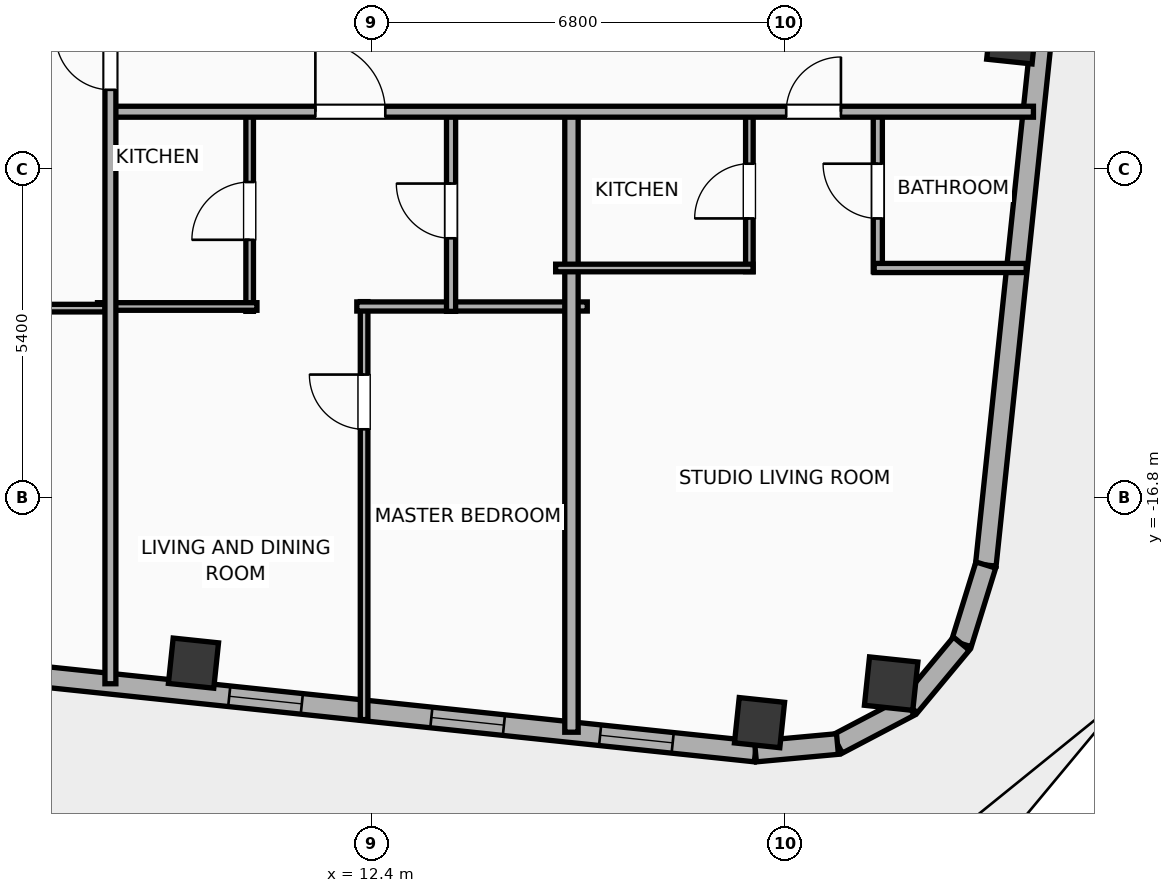
"""IFC4 building model, lengths in metres.
Left out: names, types, materials, properties, quantities, classifications, styles, units other than length and angle.
Written with IfcOpenShell. Run it as: python <this file> out.ifc"""

import sys

from ifc_helpers import new_model, si_unit, direction, frame, frame_2d, origin, origin_2d, place, context, subcontext, project, spatial, rectangle, hollow_rectangle, hollow_circle, extrude, element, fill, save


model = new_model("IFC4")
c1 = context("Model", 3, precision=1e-05, world=origin(), true_north=direction((0.0, 1.0)))
c2 = subcontext(c1, "Body", "Model", "MODEL_VIEW")
j1 = project(units=[si_unit("LENGTHUNIT", "METRE"), si_unit("PLANEANGLEUNIT", "RADIAN")], contexts=[c1])
p1 = place(None, origin())
s1 = spatial("IfcSite", under=j1, at=p1, CompositionType="ELEMENT")
p2 = place(p1, origin())
s2 = spatial("IfcBuilding", under=s1, at=p2, CompositionType="ELEMENT")
p3 = place(p2, frame((0.0, 0.0, 291.2)))
s3 = spatial("IfcBuildingStorey", under=s2, at=p3, CompositionType="ELEMENT", Elevation=291.2)
for number, where, z_axis, x_axis in (
    (1, (9.466, -19.518, 0.0), (0.0, 0.0, 1.0), (0.995, -0.105, 0.0)),
    (2, (18.775, -20.497, 0.0), (0.0, 0.0, 1.0), (0.995, -0.105, 0.0)),
):
    element("IfcColumn", number, at=place(p3, frame(where, z_axis=z_axis, x_axis=x_axis)), inside=s3, PredefinedType="COLUMN", context=c2, shape_type="SweptSolid", body=[
        extrude(hollow_rectangle(XDim=0.75, YDim=0.75, WallThickness=0.025, at=origin_2d()), origin(), (0.0, 0.0, 1.0), 3.9),
    ])
p4 = place(p3, frame((20.939, -19.855, 0.0), z_axis=(0.0, 0.0, 1.0), x_axis=(0.994521895368, -0.104528463268, 0.0)))
e3 = element("IfcColumn", 3, at=p4, inside=s3, PredefinedType="COLUMN", context=c2, shape_type="SweptSolid", body=[
    extrude(hollow_circle(Radius=0.4, WallThickness=0.028, at=origin_2d()), origin(), (0.0, 0.0, 1.0), 3.9),
])
p5 = place(p3, frame((22.923, -9.252, 0.0), z_axis=(0.0, 0.0, 1.0), x_axis=(0.994521895368, -0.104528463268, 0.0)))
e4 = element("IfcColumn", 4, at=p5, inside=s3, PredefinedType="COLUMN", context=c2, shape_type="SweptSolid", body=[
    extrude(hollow_rectangle(XDim=0.75, YDim=0.75, WallThickness=0.025, at=origin_2d()), origin(), (0.0, 0.0, 1.0), 3.9),
])
p6 = place(p3, frame((18.708, -20.972, 0.0), z_axis=(0.0, 0.0, 1.0), x_axis=(-0.994521888554, 0.104528528102, 0.0)))
e5 = element("IfcWall", 5, at=p6, inside=s3, PredefinedType="ELEMENTEDWALL", context=c2, shape_type="SweptSolid", body=[
    extrude(rectangle(XDim=46.766, YDim=0.34, at=frame_2d((23.383, 0.0))), origin(), (0.0, 0.0, 1.0), 3.635),
])
p7 = place(p6, frame((23.733, 0.0, 0.65)))
e6 = element("IfcOpeningElement", 6, at=p7, cuts=e5, PredefinedType="OPENING", context=c2, shape_type="SweptSolid", body=[
    extrude(rectangle(XDim=2.6, YDim=2.45, at=frame_2d((1.3, 1.225))), frame((0.0, 0.18, 0.0), z_axis=(0.0, -1.0, 0.0), x_axis=(1.0, 0.0, 0.0)), (0.0, 0.0, 1.0), 0.36),
])
p8 = place(p6, frame((44.402, 0.0, 0.75)))
e7 = element("IfcOpeningElement", 7, at=p8, cuts=e5, PredefinedType="OPENING", context=c2, shape_type="SweptSolid", body=[
    extrude(rectangle(XDim=1.2, YDim=2.05, at=frame_2d((0.6, 1.025))), frame((0.0, 0.18, 0.0), z_axis=(0.0, -1.0, 0.0), x_axis=(1.0, 0.0, 0.0)), (0.0, 0.0, 1.0), 0.36),
])
p9 = place(p6, frame((39.54, 0.0, 0.75)))
e8 = element("IfcOpeningElement", 8, at=p9, cuts=e5, PredefinedType="OPENING", context=c2, shape_type="SweptSolid", body=[
    extrude(rectangle(XDim=1.2, YDim=2.05, at=frame_2d((0.6, 1.025))), frame((0.0, 0.18, 0.0), z_axis=(0.0, -1.0, 0.0), x_axis=(1.0, 0.0, 0.0)), (0.0, 0.0, 1.0), 0.36),
])
p10 = place(p6, frame((42.406, 0.0, 0.75)))
e9 = element("IfcOpeningElement", 9, at=p10, cuts=e5, PredefinedType="OPENING", context=c2, shape_type="SweptSolid", body=[
    extrude(rectangle(XDim=1.2, YDim=2.05, at=frame_2d((0.6, 1.025))), frame((0.0, 0.18, 0.0), z_axis=(0.0, -1.0, 0.0), x_axis=(1.0, 0.0, 0.0)), (0.0, 0.0, 1.0), 0.36),
])
p11 = place(p6, frame((34.933, 0.0, 0.75)))
e10 = element("IfcOpeningElement", 10, at=p11, cuts=e5, PredefinedType="OPENING", context=c2, shape_type="SweptSolid", body=[
    extrude(rectangle(XDim=1.2, YDim=2.05, at=frame_2d((0.6, 1.025))), frame((0.0, 0.18, 0.0), z_axis=(0.0, -1.0, 0.0), x_axis=(1.0, 0.0, 0.0)), (0.0, 0.0, 1.0), 0.36),
])
p12 = place(p6, frame((28.631, 0.0, 0.75)))
e11 = element("IfcOpeningElement", 11, at=p12, cuts=e5, PredefinedType="OPENING", context=c2, shape_type="SweptSolid", body=[
    extrude(rectangle(XDim=1.2, YDim=2.05, at=frame_2d((0.6, 1.025))), frame((0.0, 0.18, 0.0), z_axis=(0.0, -1.0, 0.0), x_axis=(1.0, 0.0, 0.0)), (0.0, 0.0, 1.0), 0.36),
])
p13 = place(p6, frame((30.896, 0.0, 0.75)))
e12 = element("IfcOpeningElement", 12, at=p13, cuts=e5, PredefinedType="OPENING", context=c2, shape_type="SweptSolid", body=[
    extrude(rectangle(XDim=1.2, YDim=2.05, at=frame_2d((0.6, 1.025))), frame((0.0, 0.18, 0.0), z_axis=(0.0, -1.0, 0.0), x_axis=(1.0, 0.0, 0.0)), (0.0, 0.0, 1.0), 0.36),
])
p14 = place(p6, frame((7.501, 0.0, 0.75)))
e13 = element("IfcOpeningElement", 13, at=p14, cuts=e5, PredefinedType="OPENING", context=c2, shape_type="SweptSolid", body=[
    extrude(rectangle(XDim=1.2, YDim=2.05, at=frame_2d((0.6, 1.025))), frame((0.0, 0.18, 0.0), z_axis=(0.0, -1.0, 0.0), x_axis=(1.0, 0.0, 0.0)), (0.0, 0.0, 1.0), 0.36),
])
p15 = place(p6, frame((4.159, 0.0, 0.75)))
e14 = element("IfcOpeningElement", 14, at=p15, cuts=e5, PredefinedType="OPENING", context=c2, shape_type="SweptSolid", body=[
    extrude(rectangle(XDim=1.2, YDim=2.05, at=frame_2d((0.6, 1.025))), frame((0.0, 0.18, 0.0), z_axis=(0.0, -1.0, 0.0), x_axis=(1.0, 0.0, 0.0)), (0.0, 0.0, 1.0), 0.36),
])
p16 = place(p6, frame((1.369, 0.0, 0.75)))
e15 = element("IfcOpeningElement", 15, at=p16, cuts=e5, PredefinedType="OPENING", context=c2, shape_type="SweptSolid", body=[
    extrude(rectangle(XDim=1.2, YDim=2.05, at=frame_2d((0.6, 1.025))), frame((0.0, 0.18, 0.0), z_axis=(0.0, -1.0, 0.0), x_axis=(1.0, 0.0, 0.0)), (0.0, 0.0, 1.0), 0.36),
])
p17 = place(p6, frame((20.254, 0.0, 0.75)))
e16 = element("IfcOpeningElement", 16, at=p17, cuts=e5, PredefinedType="OPENING", context=c2, shape_type="SweptSolid", body=[
    extrude(rectangle(XDim=1.2, YDim=2.05, at=frame_2d((0.6, 1.025))), frame((0.0, 0.18, 0.0), z_axis=(0.0, -1.0, 0.0), x_axis=(1.0, 0.0, 0.0)), (0.0, 0.0, 1.0), 0.36),
])
p18 = place(p6, frame((16.172, 0.0, 0.75)))
e17 = element("IfcOpeningElement", 17, at=p18, cuts=e5, PredefinedType="OPENING", context=c2, shape_type="SweptSolid", body=[
    extrude(rectangle(XDim=1.2, YDim=2.05, at=frame_2d((0.6, 1.025))), frame((0.0, 0.18, 0.0), z_axis=(0.0, -1.0, 0.0), x_axis=(1.0, 0.0, 0.0)), (0.0, 0.0, 1.0), 0.36),
])
p19 = place(p6, frame((12.11, 0.0, 0.75)))
e18 = element("IfcOpeningElement", 18, at=p19, cuts=e5, PredefinedType="OPENING", context=c2, shape_type="SweptSolid", body=[
    extrude(rectangle(XDim=1.2, YDim=2.05, at=frame_2d((0.6, 1.025))), frame((0.0, 0.18, 0.0), z_axis=(0.0, -1.0, 0.0), x_axis=(1.0, 0.0, 0.0)), (0.0, 0.0, 1.0), 0.36),
])
p20 = place(p3, frame((25.67, 12.296, 0.0), z_axis=(0.0, 0.0, 1.0), x_axis=(-0.104533282919, -0.994521388791, 0.0)))
e19 = element("IfcWall", 19, at=p20, inside=s3, PredefinedType="ELEMENTEDWALL", context=c2, shape_type="SweptSolid", body=[
    extrude(rectangle(XDim=30.366, YDim=0.34, at=frame_2d((15.183, 0.0))), origin(), (0.0, 0.0, 1.0), 3.635),
])
p21 = place(p20, frame((5.442, 0.0, 0.65)))
e20 = element("IfcOpeningElement", 20, at=p21, cuts=e19, PredefinedType="OPENING", context=c2, shape_type="SweptSolid", body=[
    extrude(rectangle(XDim=2.6, YDim=2.45, at=frame_2d((1.3, 1.225))), frame((0.0, 0.18, 0.0), z_axis=(0.0, -1.0, 0.0), x_axis=(1.0, 0.0, 0.0)), (0.0, 0.0, 1.0), 0.36),
])
p22 = place(p20, frame((18.005, 0.0, 0.75)))
e21 = element("IfcOpeningElement", 21, at=p22, cuts=e19, PredefinedType="OPENING", context=c2, shape_type="SweptSolid", body=[
    extrude(rectangle(XDim=1.2, YDim=2.05, at=frame_2d((0.6, 1.025))), frame((0.0, 0.18, 0.0), z_axis=(0.0, -1.0, 0.0), x_axis=(1.0, 0.0, 0.0)), (0.0, 0.0, 1.0), 0.36),
])
p23 = place(p3, frame((22.496, -17.905, 0.0), z_axis=(0.0, 0.0, 1.0), x_axis=(-0.296416228123, -0.955058856671, 0.0)))
e22 = element("IfcWall", 22, at=p23, inside=s3, PredefinedType="ELEMENTEDWALL", context=c2, shape_type="SweptSolid", body=[
    extrude(rectangle(XDim=1.354, YDim=0.34, at=frame_2d((0.677, 0.0))), origin(), (0.0, 0.0, 1.0), 3.635),
])
p24 = place(p3, frame((22.094, -19.198, 0.0), z_axis=(0.0, 0.0, 1.0), x_axis=(-0.639501603217, -0.768789762863, 0.0)))
e23 = element("IfcWall", 23, at=p24, inside=s3, PredefinedType="ELEMENTEDWALL", context=c2, shape_type="SweptSolid", body=[
    extrude(rectangle(XDim=1.337, YDim=0.34, at=frame_2d((0.668, 0.0))), origin(), (0.0, 0.0, 1.0), 3.635),
])
p25 = place(p3, frame((21.24, -20.226, 0.0), z_axis=(0.0, 0.0, 1.0), x_axis=(-0.884922182678, -0.465738908193, 0.0)))
e24 = element("IfcWall", 24, at=p25, inside=s3, PredefinedType="ELEMENTEDWALL", context=c2, shape_type="SweptSolid", body=[
    extrude(rectangle(XDim=1.337, YDim=0.34, at=frame_2d((0.668, 0.0))), origin(), (0.0, 0.0, 1.0), 3.635),
])
p26 = place(p3, frame((20.056, -20.848, 0.0), z_axis=(0.0, 0.0, 1.0), x_axis=(-0.995813013343, -0.091413579172, 0.0)))
e25 = element("IfcWall", 25, at=p26, inside=s3, PredefinedType="ELEMENTEDWALL", context=c2, shape_type="SweptSolid", body=[
    extrude(rectangle(XDim=1.354, YDim=0.34, at=frame_2d((0.677, 0.0))), origin(), (0.0, 0.0, 1.0), 3.635),
])
p27 = place(p3, frame((12.272, -20.447, 0.0), z_axis=(0.0, 0.0, 1.0), x_axis=(0.0, 1.0, 0.0)))
e26 = element("IfcWall", 26, at=p27, inside=s3, PredefinedType="PARTITIONING", context=c2, shape_type="SweptSolid", body=[
    extrude(rectangle(XDim=6.874, YDim=0.125, at=frame_2d((3.437, 0.0))), origin(), (0.0, 0.0, 1.0), 3.635),
])
p28 = place(p27, frame((4.774, 0.0, 0.0)))
e27 = element("IfcOpeningElement", 27, at=p28, cuts=e26, PredefinedType="OPENING", context=c2, shape_type="SweptSolid", body=[
    extrude(rectangle(XDim=0.9, YDim=2.05, at=frame_2d((0.45, 1.025))), frame((0.0, 0.073, 0.0), z_axis=(0.0, -1.0, 0.0), x_axis=(1.0, 0.0, 0.0)), (0.0, 0.0, 1.0), 0.145),
])
p29 = place(p3, frame((12.152, -13.653, 0.0), z_axis=(0.0, 0.0, 1.0), x_axis=(1.0, 0.0, 0.0)))
e28 = element("IfcWall", 28, at=p29, inside=s3, PredefinedType="PLUMBINGWALL", context=c2, shape_type="SweptSolid", body=[
    extrude(rectangle(XDim=3.79, YDim=0.15, at=frame_2d((1.895, 0.0))), origin(), (0.0, 0.0, 1.0), 3.635),
])
p30 = place(p3, frame((10.39, -13.733, 0.0), z_axis=(0.0, 0.0, 1.0), x_axis=(0.0, 1.0, 0.0)))
e29 = element("IfcWall", 29, at=p30, inside=s3, PredefinedType="PARTITIONING", context=c2, shape_type="SweptSolid", body=[
    extrude(rectangle(XDim=3.303, YDim=0.125, at=frame_2d((1.651, 0.0))), origin(), (0.0, 0.0, 1.0), 3.635),
])
p31 = place(p30, frame((1.177, 0.0, 0.0)))
e30 = element("IfcOpeningElement", 30, at=p31, cuts=e29, PredefinedType="OPENING", context=c2, shape_type="SweptSolid", body=[
    extrude(rectangle(XDim=0.95, YDim=2.05, at=frame_2d((0.475, 1.025))), frame((0.0, 0.073, 0.0), z_axis=(0.0, -1.0, 0.0), x_axis=(1.0, 0.0, 0.0)), (0.0, 0.0, 1.0), 0.145),
])
p32 = place(p3, frame((7.887, -13.653, 0.0), z_axis=(0.0, 0.0, 1.0), x_axis=(1.0, 0.0, 0.0)))
e31 = element("IfcWall", 31, at=p32, inside=s3, PredefinedType="PARTITIONING", context=c2, shape_type="SweptSolid", body=[
    extrude(rectangle(XDim=2.623, YDim=0.125, at=frame_2d((1.311, 0.0))), origin(), (0.0, 0.0, 1.0), 3.635),
])
p33 = place(p3, frame((13.702, -13.733, 0.0), z_axis=(0.0, 0.0, 1.0), x_axis=(0.0, 1.0, 0.0)))
e32 = element("IfcWall", 32, at=p33, inside=s3, PredefinedType="PLUMBINGWALL", context=c2, shape_type="SweptSolid", body=[
    extrude(rectangle(XDim=3.303, YDim=0.15, at=frame_2d((1.651, 0.0))), origin(), (0.0, 0.0, 1.0), 3.635),
])
p34 = place(p33, frame((1.201, 0.0, 0.0)))
e33 = element("IfcOpeningElement", 33, at=p34, cuts=e32, PredefinedType="OPENING", context=c2, shape_type="SweptSolid", body=[
    extrude(rectangle(XDim=0.9, YDim=2.05, at=frame_2d((0.45, 1.025))), frame((0.0, 0.085, 0.0), z_axis=(0.0, -1.0, 0.0), x_axis=(1.0, 0.0, 0.0)), (0.0, 0.0, 1.0), 0.17),
])
p35 = place(p3, frame((15.682, -20.654, 0.0), z_axis=(0.0, 0.0, 1.0), x_axis=(0.0, 1.0, 0.0)))
e34 = element("IfcWall", 34, at=p35, inside=s3, PredefinedType="PARTITIONING", context=c2, shape_type="SweptSolid", body=[
    extrude(rectangle(XDim=10.284, YDim=0.22, at=frame_2d((5.142, 0.0))), origin(), (0.0, 0.0, 1.0), 3.635),
])
p36 = place(p3, frame((18.608, -13.08, 0.0), z_axis=(0.0, 0.0, 1.0), x_axis=(0.0, 1.0, 0.0)))
e35 = element("IfcWall", 35, at=p36, inside=s3, PredefinedType="PARTITIONING", context=c2, shape_type="SweptSolid", body=[
    extrude(rectangle(XDim=2.65, YDim=0.125, at=frame_2d((1.325, 0.0))), origin(), (0.0, 0.0, 1.0), 3.635),
])
p37 = place(p36, frame((0.875, 0.0, 0.0)))
e36 = element("IfcOpeningElement", 36, at=p37, cuts=e35, PredefinedType="OPENING", context=c2, shape_type="SweptSolid", body=[
    extrude(rectangle(XDim=0.9, YDim=2.05, at=frame_2d((0.45, 1.025))), frame((0.0, 0.073, 0.0), z_axis=(0.0, -1.0, 0.0), x_axis=(1.0, 0.0, 0.0)), (0.0, 0.0, 1.0), 0.145),
])
p38 = place(p3, frame((20.72, -13.08, 0.0), z_axis=(0.0, 0.0, 1.0), x_axis=(0.0, 1.0, 0.0)))
e37 = element("IfcWall", 37, at=p38, inside=s3, PredefinedType="PLUMBINGWALL", context=c2, shape_type="SweptSolid", body=[
    extrude(rectangle(XDim=2.65, YDim=0.15, at=frame_2d((1.325, 0.0))), origin(), (0.0, 0.0, 1.0), 3.635),
])
p39 = place(p38, frame((0.875, 0.0, 0.0)))
e38 = element("IfcOpeningElement", 38, at=p39, cuts=e37, PredefinedType="OPENING", context=c2, shape_type="SweptSolid", body=[
    extrude(rectangle(XDim=0.9, YDim=2.05, at=frame_2d((0.45, 1.025))), frame((0.0, 0.085, 0.0), z_axis=(0.0, -1.0, 0.0), x_axis=(1.0, 0.0, 0.0)), (0.0, 0.0, 1.0), 0.17),
])
p40 = place(p3, frame((15.422, -13.02, 0.0), z_axis=(0.0, 0.0, 1.0), x_axis=(1.0, 0.0, 0.0)))
e39 = element("IfcWall", 39, at=p40, inside=s3, PredefinedType="PARTITIONING", context=c2, shape_type="SweptSolid", body=[
    extrude(rectangle(XDim=3.246, YDim=0.125, at=frame_2d((1.623, 0.0))), origin(), (0.0, 0.0, 1.0), 3.635),
])
p41 = place(p3, frame((20.66, -13.02, 0.0), z_axis=(0.0, 0.0, 1.0), x_axis=(1.0, 0.0, 0.0)))
e40 = element("IfcWall", 40, at=p41, inside=s3, PredefinedType="PLUMBINGWALL", context=c2, shape_type="SweptSolid", body=[
    extrude(rectangle(XDim=2.5, YDim=0.15, at=frame_2d((1.25, 0.0))), origin(), (0.0, 0.0, 1.0), 3.635),
])
p42 = place(p3, frame((8.08, -10.45, 0.0), z_axis=(0.0, 0.0, 1.0), x_axis=(1.0, 0.0, 0.0)))
e41 = element("IfcWall", 41, at=p42, inside=s3, PredefinedType="PARTITIONING", context=c2, shape_type="SweptSolid", body=[
    extrude(rectangle(XDim=15.199, YDim=0.18, at=frame_2d((7.6, 0.0))), origin(), (0.0, 0.0, 1.0), 3.635),
])
p43 = place(p42, frame((3.39, 0.0, 0.0)))
e42 = element("IfcOpeningElement", 42, at=p43, cuts=e41, PredefinedType="OPENING", context=c2, shape_type="SweptSolid", body=[
    extrude(rectangle(XDim=1.15, YDim=2.05, at=frame_2d((0.575, 1.025))), frame((0.0, 0.1, 0.0), z_axis=(0.0, -1.0, 0.0), x_axis=(1.0, 0.0, 0.0)), (0.0, 0.0, 1.0), 0.2),
])
p44 = place(p42, frame((11.134, 0.0, 0.0)))
e43 = element("IfcOpeningElement", 43, at=p44, cuts=e41, PredefinedType="OPENING", context=c2, shape_type="SweptSolid", body=[
    extrude(rectangle(XDim=0.9, YDim=2.05, at=frame_2d((0.45, 1.025))), frame((0.0, 0.1, 0.0), z_axis=(0.0, -1.0, 0.0), x_axis=(1.0, 0.0, 0.0)), (0.0, 0.0, 1.0), 0.2),
])
p45 = place(p3, frame((0.02, -13.68, 0.0), z_axis=(0.0, 0.0, 1.0), x_axis=(1.0, 0.0, 0.0)))
e44 = element("IfcWall", 44, at=p45, inside=s3, PredefinedType="PARTITIONING", context=c2, shape_type="SweptSolid", body=[
    extrude(rectangle(XDim=7.992, YDim=0.125, at=frame_2d((3.996, 0.0))), origin(), (0.0, 0.0, 1.0), 3.635),
])
p46 = place(p45, frame((1.323, 0.0, 0.0)))
e45 = element("IfcOpeningElement", 45, at=p46, cuts=e44, PredefinedType="OPENING", context=c2, shape_type="SweptSolid", body=[
    extrude(rectangle(XDim=0.9, YDim=2.05, at=frame_2d((0.45, 1.025))), frame((0.0, 0.073, 0.0), z_axis=(0.0, -1.0, 0.0), x_axis=(1.0, 0.0, 0.0)), (0.0, 0.0, 1.0), 0.145),
])
p47 = place(p45, frame((5.837, 0.0, 0.0)))
e46 = element("IfcOpeningElement", 46, at=p47, cuts=e44, PredefinedType="OPENING", context=c2, shape_type="SweptSolid", body=[
    extrude(rectangle(XDim=0.9, YDim=2.05, at=frame_2d((0.45, 1.025))), frame((0.0, 0.073, 0.0), z_axis=(0.0, -1.0, 0.0), x_axis=(1.0, 0.0, 0.0)), (0.0, 0.0, 1.0), 0.145),
])
p48 = place(p3, frame((8.1, -19.857, 0.0), z_axis=(0.0, 0.0, 1.0), x_axis=(0.0, 1.0, 0.0)))
e47 = element("IfcWall", 47, at=p48, inside=s3, PredefinedType="PARTITIONING", context=c2, shape_type="SweptSolid", body=[
    extrude(rectangle(XDim=11.017, YDim=0.18, at=frame_2d((5.509, 0.0))), origin(), (0.0, 0.0, 1.0), 3.635),
])
p49 = place(p48, frame((9.767, 0.0, 0.0)))
e48 = element("IfcOpeningElement", 48, at=p49, cuts=e47, PredefinedType="OPENING", context=c2, shape_type="SweptSolid", body=[
    extrude(rectangle(XDim=0.9, YDim=2.05, at=frame_2d((0.45, 1.025))), frame((0.0, 0.1, 0.0), z_axis=(0.0, -1.0, 0.0), x_axis=(1.0, 0.0, 0.0)), (0.0, 0.0, 1.0), 0.2),
])
p50 = place(p14, origin())
e49 = element("IfcWindow", 49, at=p50, inside=s3, PartitioningType="SINGLE_PANEL", PredefinedType="WINDOW", context=c2, shape_type="SweptSolid", body=[
    extrude(rectangle(XDim=1.2, YDim=2.05, at=frame_2d((0.6, 1.025))), frame((0.0, 0.03, 0.0), z_axis=(0.0, -1.0, 0.0), x_axis=(1.0, 0.0, 0.0)), (0.0, 0.0, 1.0), 0.06),
])
fill(e13, e49)
p51 = place(p15, origin())
e50 = element("IfcWindow", 50, at=p51, inside=s3, PartitioningType="SINGLE_PANEL", PredefinedType="WINDOW", context=c2, shape_type="SweptSolid", body=[
    extrude(rectangle(XDim=1.2, YDim=2.05, at=frame_2d((0.6, 1.025))), frame((0.0, 0.03, 0.0), z_axis=(0.0, -1.0, 0.0), x_axis=(1.0, 0.0, 0.0)), (0.0, 0.0, 1.0), 0.06),
])
fill(e14, e50)
p52 = place(p16, origin())
e51 = element("IfcWindow", 51, at=p52, inside=s3, PartitioningType="SINGLE_PANEL", PredefinedType="WINDOW", context=c2, shape_type="SweptSolid", body=[
    extrude(rectangle(XDim=1.2, YDim=2.05, at=frame_2d((0.6, 1.025))), frame((0.0, 0.03, 0.0), z_axis=(0.0, -1.0, 0.0), x_axis=(1.0, 0.0, 0.0)), (0.0, 0.0, 1.0), 0.06),
])
fill(e15, e51)
p53 = place(p28, origin())
e52 = element("IfcDoor", 52, at=p53, inside=s3, OperationType="SINGLE_SWING_RIGHT", PredefinedType="DOOR", context=c2, shape_type="SweptSolid", body=[
    extrude(rectangle(XDim=0.9, YDim=2.05, at=frame_2d((0.45, 1.025))), frame((0.0, 0.025, 0.0), z_axis=(0.0, -1.0, 0.0), x_axis=(1.0, 0.0, 0.0)), (0.0, 0.0, 1.0), 0.05),
])
fill(e27, e52)
p54 = place(p31, origin())
e53 = element("IfcDoor", 53, at=p54, inside=s3, OperationType="SINGLE_SWING_LEFT", PredefinedType="DOOR", context=c2, shape_type="SweptSolid", body=[
    extrude(rectangle(XDim=0.95, YDim=2.05, at=frame_2d((0.475, 1.025))), frame((0.0, 0.025, 0.0), z_axis=(0.0, -1.0, 0.0), x_axis=(1.0, 0.0, 0.0)), (0.0, 0.0, 1.0), 0.05),
])
fill(e30, e53)
p55 = place(p34, origin())
e54 = element("IfcDoor", 54, at=p55, inside=s3, OperationType="SINGLE_SWING_RIGHT", PredefinedType="DOOR", context=c2, shape_type="SweptSolid", body=[
    extrude(rectangle(XDim=0.9, YDim=2.05, at=frame_2d((0.45, 1.025))), frame((0.0, 0.025, 0.0), z_axis=(0.0, -1.0, 0.0), x_axis=(1.0, 0.0, 0.0)), (0.0, 0.0, 1.0), 0.05),
])
fill(e33, e54)
p56 = place(p37, origin())
e55 = element("IfcDoor", 55, at=p56, inside=s3, OperationType="SINGLE_SWING_LEFT", PredefinedType="DOOR", context=c2, shape_type="SweptSolid", body=[
    extrude(rectangle(XDim=0.9, YDim=2.05, at=frame_2d((0.45, 1.025))), frame((0.0, 0.025, 0.0), z_axis=(0.0, -1.0, 0.0), x_axis=(1.0, 0.0, 0.0)), (0.0, 0.0, 1.0), 0.05),
])
fill(e36, e55)
p57 = place(p39, origin())
e56 = element("IfcDoor", 56, at=p57, inside=s3, OperationType="SINGLE_SWING_RIGHT", PredefinedType="DOOR", context=c2, shape_type="SweptSolid", body=[
    extrude(rectangle(XDim=0.9, YDim=2.05, at=frame_2d((0.45, 1.025))), frame((0.0, 0.025, 0.0), z_axis=(0.0, -1.0, 0.0), x_axis=(1.0, 0.0, 0.0)), (0.0, 0.0, 1.0), 0.05),
])
fill(e38, e56)
p58 = place(p43, origin())
e57 = element("IfcDoor", 57, at=p58, inside=s3, OperationType="SINGLE_SWING_LEFT", PredefinedType="DOOR", context=c2, shape_type="SweptSolid", body=[
    extrude(rectangle(XDim=1.15, YDim=2.05, at=frame_2d((0.575, 1.025))), frame((0.0, 0.025, 0.0), z_axis=(0.0, -1.0, 0.0), x_axis=(1.0, 0.0, 0.0)), (0.0, 0.0, 1.0), 0.05),
])
fill(e42, e57)
p59 = place(p44, origin())
e58 = element("IfcDoor", 58, at=p59, inside=s3, OperationType="SINGLE_SWING_RIGHT", PredefinedType="DOOR", context=c2, shape_type="SweptSolid", body=[
    extrude(rectangle(XDim=0.9, YDim=2.05, at=frame_2d((0.45, 1.025))), frame((0.0, 0.025, 0.0), z_axis=(0.0, -1.0, 0.0), x_axis=(1.0, 0.0, 0.0)), (0.0, 0.0, 1.0), 0.05),
])
fill(e43, e58)
p60 = place(p49, origin())
e59 = element("IfcDoor", 59, at=p60, inside=s3, OperationType="SINGLE_SWING_RIGHT", PredefinedType="DOOR", context=c2, shape_type="SweptSolid", body=[
    extrude(rectangle(XDim=0.9, YDim=2.05, at=frame_2d((0.45, 1.025))), frame((0.0, 0.025, 0.0), z_axis=(0.0, -1.0, 0.0), x_axis=(1.0, 0.0, 0.0)), (0.0, 0.0, 1.0), 0.05),
])
fill(e48, e59)
save(model, sys.argv[1])
